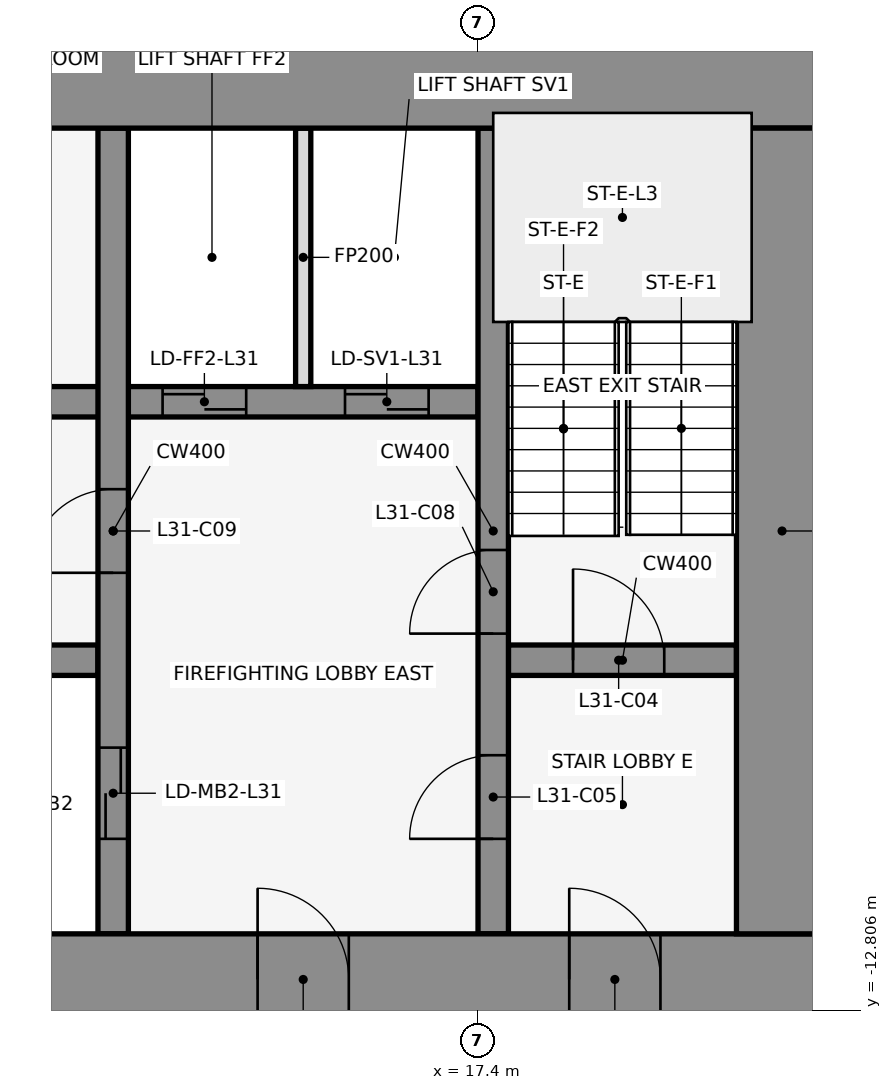
"""IFC4 building model, lengths in metres.
Left out: names, types, materials, properties, quantities, classifications, styles, units other than length and angle.
Written with IfcOpenShell. Run it as: python <this file> out.ifc"""

import sys

from ifc_helpers import new_model, si_unit, direction, frame, frame_2d, origin, place, context, subcontext, project, spatial, rectangle, extrude, element, fill, save


model = new_model("IFC4")
c1 = context("Model", 3, precision=1e-05, world=origin(), true_north=direction((0.0, 1.0)))
c2 = subcontext(c1, "Body", "Model", "MODEL_VIEW")
j1 = project(units=[si_unit("LENGTHUNIT", "METRE"), si_unit("PLANEANGLEUNIT", "RADIAN")], contexts=[c1])
p1 = place(None, origin())
s1 = spatial("IfcSite", under=j1, at=p1, CompositionType="ELEMENT")
p2 = place(p1, origin())
s2 = spatial("IfcBuilding", under=s1, at=p2, CompositionType="ELEMENT")
p3 = place(p2, frame((0.0, 0.0, 144.5)))
s3 = spatial("IfcBuildingStorey", under=s2, at=p3, CompositionType="ELEMENT", Elevation=144.5)
p4 = place(p3, frame((16.432, -0.105, 0.0), z_axis=(0.0, 0.0, 1.0), x_axis=(-0.83981312244, 0.542875602121, 0.0)))
e1 = element("IfcWall", 1, at=p4, inside=s3, PredefinedType="STANDARD", context=c2, shape_type="SweptSolid", body=[
    extrude(rectangle(XDim=2.183, YDim=0.25, at=frame_2d((1.091, 0.0))), origin(), (0.0, 0.0, 1.0), 3.95),
])
p5 = place(p3, frame((6.4, -8.2, 0.0), z_axis=(0.0, 0.0, 1.0), x_axis=(1.0, 0.0, 0.0)))
e2 = element("IfcWall", 2, at=p5, inside=s3, PredefinedType="SHEAR", context=c2, shape_type="SweptSolid", body=[
    extrude(rectangle(XDim=6.0, YDim=0.4, at=frame_2d((3.0, 0.0))), origin(), (0.0, 0.0, 1.0), 4.1),
])
p6 = place(p3, frame((17.8, -8.2, 0.0), z_axis=(0.0, 0.0, 1.0), x_axis=(1.0, 0.0, 0.0)))
e3 = element("IfcWall", 3, at=p6, inside=s3, PredefinedType="SHEAR", context=c2, shape_type="SweptSolid", body=[
    extrude(rectangle(XDim=3.0, YDim=0.4, at=frame_2d((1.5, 0.0))), origin(), (0.0, 0.0, 1.0), 4.1),
])
p7 = place(p6, frame((0.85, 0.0, 0.0)))
e4 = element("IfcOpeningElement", 4, at=p7, cuts=e3, PredefinedType="OPENING", context=c2, shape_type="SweptSolid", body=[
    extrude(rectangle(XDim=1.2, YDim=2.1, at=frame_2d((0.6, 1.05))), frame((0.0, 0.212, 0.0), z_axis=(0.0, -1.0, 0.0), x_axis=(1.0, 0.0, 0.0)), (0.0, 0.0, 1.0), 0.424),
])
p8 = place(p3, frame((3.8, -4.8, 0.0), z_axis=(0.0, 0.0, 1.0), x_axis=(1.0, 0.0, 0.0)))
e5 = element("IfcWall", 5, at=p8, inside=s3, PredefinedType="SHEAR", context=c2, shape_type="SweptSolid", body=[
    extrude(rectangle(XDim=13.6, YDim=0.4, at=frame_2d((6.8, 0.0))), origin(), (0.0, 0.0, 1.0), 4.1),
])
p9 = place(p8, frame((9.45, 0.0, 0.0)))
e6 = element("IfcOpeningElement", 6, at=p9, cuts=e5, PredefinedType="OPENING", context=c2, shape_type="SweptSolid", body=[
    extrude(rectangle(XDim=1.1, YDim=2.1, at=frame_2d((0.55, 1.05))), frame((0.0, 0.212, 0.0), z_axis=(0.0, -1.0, 0.0), x_axis=(1.0, 0.0, 0.0)), (0.0, 0.0, 1.0), 0.424),
])
p10 = place(p8, frame((11.85, 0.0, 0.0)))
e7 = element("IfcOpeningElement", 7, at=p10, cuts=e5, PredefinedType="OPENING", context=c2, shape_type="SweptSolid", body=[
    extrude(rectangle(XDim=1.1, YDim=2.1, at=frame_2d((0.55, 1.05))), frame((0.0, 0.212, 0.0), z_axis=(0.0, -1.0, 0.0), x_axis=(1.0, 0.0, 0.0)), (0.0, 0.0, 1.0), 0.424),
])
p11 = place(p8, frame((2.45, 0.0, 0.0)))
e8 = element("IfcOpeningElement", 8, at=p11, cuts=e5, PredefinedType="OPENING", context=c2, shape_type="SweptSolid", body=[
    extrude(rectangle(XDim=0.9, YDim=2.1, at=frame_2d((0.45, 1.05))), frame((0.0, 0.212, 0.0), z_axis=(0.0, -1.0, 0.0), x_axis=(1.0, 0.0, 0.0)), (0.0, 0.0, 1.0), 0.424),
])
p12 = place(p8, frame((6.85, 0.0, 0.0)))
e9 = element("IfcOpeningElement", 9, at=p12, cuts=e5, PredefinedType="OPENING", context=c2, shape_type="SweptSolid", body=[
    extrude(rectangle(XDim=0.9, YDim=2.1, at=frame_2d((0.45, 1.05))), frame((0.0, 0.212, 0.0), z_axis=(0.0, -1.0, 0.0), x_axis=(1.0, 0.0, 0.0)), (0.0, 0.0, 1.0), 0.424),
])
p13 = place(p3, frame((12.6, -11.8, 0.0), z_axis=(0.0, 0.0, 1.0), x_axis=(0.0, 1.0, 0.0)))
e10 = element("IfcWall", 10, at=p13, inside=s3, PredefinedType="SHEAR", context=c2, shape_type="SweptSolid", body=[
    extrude(rectangle(XDim=10.6, YDim=0.4, at=frame_2d((5.3, 0.0))), origin(), (0.0, 0.0, 1.0), 4.1),
])
p14 = place(p13, frame((1.25, 0.0, 0.0)))
e11 = element("IfcOpeningElement", 11, at=p14, cuts=e10, PredefinedType="OPENING", context=c2, shape_type="SweptSolid", body=[
    extrude(rectangle(XDim=1.2, YDim=2.1, at=frame_2d((0.6, 1.05))), frame((0.0, 0.212, 0.0), z_axis=(0.0, -1.0, 0.0), x_axis=(1.0, 0.0, 0.0)), (0.0, 0.0, 1.0), 0.424),
])
p15 = place(p13, frame((4.75, 0.0, 0.0)))
e12 = element("IfcOpeningElement", 12, at=p15, cuts=e10, PredefinedType="OPENING", context=c2, shape_type="SweptSolid", body=[
    extrude(rectangle(XDim=1.1, YDim=2.1, at=frame_2d((0.55, 1.05))), frame((0.0, 0.212, 0.0), z_axis=(0.0, -1.0, 0.0), x_axis=(1.0, 0.0, 0.0)), (0.0, 0.0, 1.0), 0.424),
])
p16 = place(p3, frame((15.1, -4.6, 0.0), z_axis=(0.0, 0.0, 1.0), x_axis=(0.0, 1.0, 0.0)))
e13 = element("IfcWall", 13, at=p16, inside=s3, PredefinedType="PARTITIONING", context=c2, shape_type="SweptSolid", body=[
    extrude(rectangle(XDim=3.4, YDim=0.2, at=frame_2d((1.7, 0.0))), origin(), (0.0, 0.0, 1.0), 2.84),
])
p17 = place(p3, frame((17.6, -11.8, 0.0), z_axis=(0.0, 0.0, 1.0), x_axis=(0.0, 1.0, 0.0)))
e14 = element("IfcWall", 14, at=p17, inside=s3, PredefinedType="SHEAR", context=c2, shape_type="SweptSolid", body=[
    extrude(rectangle(XDim=10.6, YDim=0.4, at=frame_2d((5.3, 0.0))), origin(), (0.0, 0.0, 1.0), 4.1),
])
p18 = place(p17, frame((1.25, 0.0, 0.0)))
e15 = element("IfcOpeningElement", 15, at=p18, cuts=e14, PredefinedType="OPENING", context=c2, shape_type="SweptSolid", body=[
    extrude(rectangle(XDim=1.1, YDim=2.1, at=frame_2d((0.55, 1.05))), frame((0.0, 0.212, 0.0), z_axis=(0.0, -1.0, 0.0), x_axis=(1.0, 0.0, 0.0)), (0.0, 0.0, 1.0), 0.424),
])
p19 = place(p17, frame((3.95, 0.0, 0.0)))
e16 = element("IfcOpeningElement", 16, at=p19, cuts=e14, PredefinedType="OPENING", context=c2, shape_type="SweptSolid", body=[
    extrude(rectangle(XDim=1.1, YDim=2.1, at=frame_2d((0.55, 1.05))), frame((0.0, 0.212, 0.0), z_axis=(0.0, -1.0, 0.0), x_axis=(1.0, 0.0, 0.0)), (0.0, 0.0, 1.0), 0.424),
])
p20 = place(p3, frame((-22.0, -0.6, 0.0), z_axis=(0.0, 0.0, 1.0), x_axis=(1.0, 0.0, 0.0)))
e17 = element("IfcWall", 17, at=p20, inside=s3, PredefinedType="SHEAR", context=c2, shape_type="SweptSolid", body=[
    extrude(rectangle(XDim=44.0, YDim=1.2, at=frame_2d((22.0, 0.0))), origin(), (0.0, 0.0, 1.0), 4.1),
])
p21 = place(p20, frame((18.55, 0.0, 0.0)))
e18 = element("IfcOpeningElement", 18, at=p21, cuts=e17, PredefinedType="OPENING", context=c2, shape_type="SweptSolid", body=[
    extrude(rectangle(XDim=0.9, YDim=2.1, at=frame_2d((0.45, 1.05))), frame((0.0, 0.612, 0.0), z_axis=(0.0, -1.0, 0.0), x_axis=(1.0, 0.0, 0.0)), (0.0, 0.0, 1.0), 1.224),
])
p22 = place(p20, frame((24.55, 0.0, 0.0)))
e19 = element("IfcOpeningElement", 19, at=p22, cuts=e17, PredefinedType="OPENING", context=c2, shape_type="SweptSolid", body=[
    extrude(rectangle(XDim=0.9, YDim=2.1, at=frame_2d((0.45, 1.05))), frame((0.0, 0.612, 0.0), z_axis=(0.0, -1.0, 0.0), x_axis=(1.0, 0.0, 0.0)), (0.0, 0.0, 1.0), 1.224),
])
p23 = place(p3, frame((-22.0, -12.4, 0.0), z_axis=(0.0, 0.0, 1.0), x_axis=(1.0, 0.0, 0.0)))
e20 = element("IfcWall", 20, at=p23, inside=s3, PredefinedType="SHEAR", context=c2, shape_type="SweptSolid", body=[
    extrude(rectangle(XDim=44.0, YDim=1.2, at=frame_2d((22.0, 0.0))), origin(), (0.0, 0.0, 1.0), 4.1),
])
p24 = place(p23, frame((2.2, 0.0, 0.0)))
e21 = element("IfcOpeningElement", 21, at=p24, cuts=e20, PredefinedType="OPENING", context=c2, shape_type="SweptSolid", body=[
    extrude(rectangle(XDim=1.2, YDim=2.1, at=frame_2d((0.6, 1.05))), frame((0.0, 0.612, 0.0), z_axis=(0.0, -1.0, 0.0), x_axis=(1.0, 0.0, 0.0)), (0.0, 0.0, 1.0), 1.224),
])
p25 = place(p23, frame((21.4, 0.0, 0.0)))
e22 = element("IfcOpeningElement", 22, at=p25, cuts=e20, PredefinedType="OPENING", context=c2, shape_type="SweptSolid", body=[
    extrude(rectangle(XDim=1.2, YDim=2.1, at=frame_2d((0.6, 1.05))), frame((0.0, 0.612, 0.0), z_axis=(0.0, -1.0, 0.0), x_axis=(1.0, 0.0, 0.0)), (0.0, 0.0, 1.0), 1.224),
])
p26 = place(p23, frame((40.6, 0.0, 0.0)))
e23 = element("IfcOpeningElement", 23, at=p26, cuts=e20, PredefinedType="OPENING", context=c2, shape_type="SweptSolid", body=[
    extrude(rectangle(XDim=1.2, YDim=2.1, at=frame_2d((0.6, 1.05))), frame((0.0, 0.612, 0.0), z_axis=(0.0, -1.0, 0.0), x_axis=(1.0, 0.0, 0.0)), (0.0, 0.0, 1.0), 1.224),
])
p27 = place(p23, frame((16.0, 0.0, 0.0)))
e24 = element("IfcOpeningElement", 24, at=p27, cuts=e20, PredefinedType="OPENING", context=c2, shape_type="SweptSolid", body=[
    extrude(rectangle(XDim=1.8, YDim=2.1, at=frame_2d((0.9, 1.05))), frame((0.0, 0.612, 0.0), z_axis=(0.0, -1.0, 0.0), x_axis=(1.0, 0.0, 0.0)), (0.0, 0.0, 1.0), 1.224),
])
p28 = place(p23, frame((6.3, 0.0, 0.0)))
e25 = element("IfcOpeningElement", 25, at=p28, cuts=e20, PredefinedType="OPENING", context=c2, shape_type="SweptSolid", body=[
    extrude(rectangle(XDim=1.2, YDim=2.1, at=frame_2d((0.6, 1.05))), frame((0.0, 0.612, 0.0), z_axis=(0.0, -1.0, 0.0), x_axis=(1.0, 0.0, 0.0)), (0.0, 0.0, 1.0), 1.224),
])
p29 = place(p23, frame((26.2, 0.0, 0.0)))
e26 = element("IfcOpeningElement", 26, at=p29, cuts=e20, PredefinedType="OPENING", context=c2, shape_type="SweptSolid", body=[
    extrude(rectangle(XDim=1.8, YDim=2.1, at=frame_2d((0.9, 1.05))), frame((0.0, 0.612, 0.0), z_axis=(0.0, -1.0, 0.0), x_axis=(1.0, 0.0, 0.0)), (0.0, 0.0, 1.0), 1.224),
])
p30 = place(p23, frame((36.5, 0.0, 0.0)))
e27 = element("IfcOpeningElement", 27, at=p30, cuts=e20, PredefinedType="OPENING", context=c2, shape_type="SweptSolid", body=[
    extrude(rectangle(XDim=1.2, YDim=2.1, at=frame_2d((0.6, 1.05))), frame((0.0, 0.612, 0.0), z_axis=(0.0, -1.0, 0.0), x_axis=(1.0, 0.0, 0.0)), (0.0, 0.0, 1.0), 1.224),
])
p31 = place(p3, frame((21.4, -11.8, 0.0), z_axis=(0.0, 0.0, 1.0), x_axis=(0.0, 1.0, 0.0)))
e28 = element("IfcWall", 28, at=p31, inside=s3, PredefinedType="SHEAR", context=c2, shape_type="SweptSolid", body=[
    extrude(rectangle(XDim=10.6, YDim=1.2, at=frame_2d((5.3, 0.0))), origin(), (0.0, 0.0, 1.0), 4.1),
])
p32 = place(p7, origin())
e29 = element("IfcDoor", 29, at=p32, inside=s3, OperationType="SINGLE_SWING_RIGHT", PredefinedType="DOOR", context=c2, shape_type="SweptSolid", body=[
    extrude(rectangle(XDim=1.2, YDim=2.1, at=frame_2d((0.6, 1.05))), frame((0.0, 0.025, 0.0), z_axis=(0.0, -1.0, 0.0), x_axis=(1.0, 0.0, 0.0)), (0.0, 0.0, 1.0), 0.05),
])
fill(e4, e29)
p33 = place(p18, origin())
e30 = element("IfcDoor", 30, at=p33, inside=s3, OperationType="SINGLE_SWING_LEFT", PredefinedType="DOOR", context=c2, shape_type="SweptSolid", body=[
    extrude(rectangle(XDim=1.1, YDim=2.1, at=frame_2d((0.55, 1.05))), frame((0.0, 0.025, 0.0), z_axis=(0.0, -1.0, 0.0), x_axis=(1.0, 0.0, 0.0)), (0.0, 0.0, 1.0), 0.05),
])
fill(e15, e30)
p34 = place(p14, origin())
e31 = element("IfcDoor", 31, at=p34, inside=s3, OperationType="DOUBLE_DOOR_SLIDING", PredefinedType="DOOR", context=c2, shape_type="SweptSolid", body=[
    extrude(rectangle(XDim=1.2, YDim=2.1, at=frame_2d((0.6, 1.05))), frame((0.0, 0.025, 0.0), z_axis=(0.0, -1.0, 0.0), x_axis=(1.0, 0.0, 0.0)), (0.0, 0.0, 1.0), 0.05),
])
fill(e11, e31)
p35 = place(p9, origin())
e32 = element("IfcDoor", 32, at=p35, inside=s3, OperationType="DOUBLE_DOOR_SLIDING", PredefinedType="DOOR", context=c2, shape_type="SweptSolid", body=[
    extrude(rectangle(XDim=1.1, YDim=2.1, at=frame_2d((0.55, 1.05))), frame((0.0, 0.025, 0.0), z_axis=(0.0, -1.0, 0.0), x_axis=(1.0, 0.0, 0.0)), (0.0, 0.0, 1.0), 0.05),
])
fill(e6, e32)
p36 = place(p10, origin())
e33 = element("IfcDoor", 33, at=p36, inside=s3, OperationType="DOUBLE_DOOR_SLIDING", PredefinedType="DOOR", context=c2, shape_type="SweptSolid", body=[
    extrude(rectangle(XDim=1.1, YDim=2.1, at=frame_2d((0.55, 1.05))), frame((0.0, 0.025, 0.0), z_axis=(0.0, -1.0, 0.0), x_axis=(1.0, 0.0, 0.0)), (0.0, 0.0, 1.0), 0.05),
])
fill(e7, e33)
p37 = place(p19, origin())
e34 = element("IfcDoor", 34, at=p37, inside=s3, OperationType="SINGLE_SWING_RIGHT", PredefinedType="DOOR", context=c2, shape_type="SweptSolid", body=[
    extrude(rectangle(XDim=1.1, YDim=2.1, at=frame_2d((0.55, 1.05))), frame((0.0, 0.025, 0.0), z_axis=(0.0, -1.0, 0.0), x_axis=(1.0, 0.0, 0.0)), (0.0, 0.0, 1.0), 0.05),
])
fill(e16, e34)
p38 = place(p15, frame((1.1, 0.0, 0.0), z_axis=(0.0, 0.0, 1.0), x_axis=(-1.0, 0.0, 0.0)))
e35 = element("IfcDoor", 35, at=p38, inside=s3, OperationType="SINGLE_SWING_RIGHT", PredefinedType="DOOR", context=c2, shape_type="SweptSolid", body=[
    extrude(rectangle(XDim=1.1, YDim=2.1, at=frame_2d((0.55, 1.05))), frame((0.0, 0.025, 0.0), z_axis=(0.0, -1.0, 0.0), x_axis=(1.0, 0.0, 0.0)), (0.0, 0.0, 1.0), 0.05),
])
fill(e12, e35)
p39 = place(p26, frame((1.2, 0.0, 0.0), z_axis=(0.0, 0.0, 1.0), x_axis=(-1.0, 0.0, 0.0)))
e36 = element("IfcDoor", 36, at=p39, inside=s3, OperationType="SINGLE_SWING_RIGHT", PredefinedType="DOOR", context=c2, shape_type="SweptSolid", body=[
    extrude(rectangle(XDim=1.2, YDim=2.1, at=frame_2d((0.6, 1.05))), frame((0.0, 0.025, 0.0), z_axis=(0.0, -1.0, 0.0), x_axis=(1.0, 0.0, 0.0)), (0.0, 0.0, 1.0), 0.05),
])
fill(e23, e36)
p40 = place(p30, frame((1.2, 0.0, 0.0), z_axis=(0.0, 0.0, 1.0), x_axis=(-1.0, 0.0, 0.0)))
e37 = element("IfcDoor", 37, at=p40, inside=s3, OperationType="SINGLE_SWING_RIGHT", PredefinedType="DOOR", context=c2, shape_type="SweptSolid", body=[
    extrude(rectangle(XDim=1.2, YDim=2.1, at=frame_2d((0.6, 1.05))), frame((0.0, 0.025, 0.0), z_axis=(0.0, -1.0, 0.0), x_axis=(1.0, 0.0, 0.0)), (0.0, 0.0, 1.0), 0.05),
])
fill(e27, e37)
save(model, sys.argv[1])
